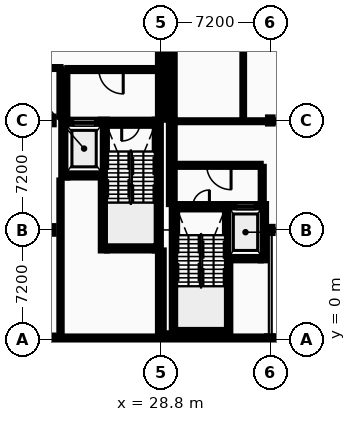
"""IFC4 building model, lengths in metres.
Left out: names, types, materials, properties, quantities, classifications, styles, units other than length and angle.
Written with IfcOpenShell. Run it as: python <this file> out.ifc"""

import sys

from ifc_helpers import new_model, si_unit, direction, frame, frame_2d, origin, origin_2d, place, context, subcontext, project, spatial, rectangle, hollow_circle, i_section, extrude, element, fill, save


model = new_model("IFC4")
c1 = context("Model", 3, precision=1e-05, world=origin(), true_north=direction((0.0, 1.0)))
c2 = subcontext(c1, "Body", "Model", "MODEL_VIEW")
j1 = project(units=[si_unit("LENGTHUNIT", "METRE"), si_unit("PLANEANGLEUNIT", "RADIAN")], contexts=[c1])
p1 = place(None, origin())
s1 = spatial("IfcSite", under=j1, at=p1, CompositionType="ELEMENT")
p2 = place(p1, origin())
s2 = spatial("IfcBuilding", under=s1, at=p2, CompositionType="ELEMENT")
p3 = place(p2, frame((0.0, 0.0, 5.2)))
s3 = spatial("IfcBuildingStorey", under=s2, at=p3, CompositionType="ELEMENT", Elevation=5.2)
for number, where, z_axis, x_axis in (
    (1, (21.6, 0.0, 0.0), (0.0, 0.0, 1.0), (1.0, 0.0, 0.0)),
    (2, (21.6, 7.2, 0.0), (0.0, 0.0, 1.0), (1.0, 0.0, 0.0)),
    (3, (21.6, 14.4, 0.0), (0.0, 0.0, 1.0), (1.0, 0.0, 0.0)),
    (4, (28.8, 0.0, 0.0), (0.0, 0.0, 1.0), (1.0, 0.0, 0.0)),
):
    element("IfcColumn", number, at=place(p3, frame(where, z_axis=z_axis, x_axis=x_axis)), inside=s3, PredefinedType="COLUMN", context=c2, shape_type="SweptSolid", body=[
        extrude(i_section(OverallWidth=0.3, OverallDepth=0.5, WebThickness=0.014, FlangeThickness=0.028, FilletRadius=0.027, at=origin_2d()), origin(), (0.0, 0.0, 1.0), 4.4),
    ])
for number, where, z_axis, x_axis in (
    (5, (29.52, 0.0, 0.0), (0.0, 0.0, 1.0), (1.0, 0.0, 0.0)),
    (6, (29.52, 14.4, 0.0), (0.0, 0.0, 1.0), (1.0, 0.0, 0.0)),
):
    element("IfcColumn", number, at=place(p3, frame(where, z_axis=z_axis, x_axis=x_axis)), inside=s3, PredefinedType="COLUMN", context=c2, shape_type="SweptSolid", body=[
        extrude(i_section(OverallWidth=0.3, OverallDepth=0.4, WebThickness=0.013, FlangeThickness=0.024, FilletRadius=0.027, at=origin_2d()), origin(), (0.0, 0.0, 1.0), 4.4),
    ])
p4 = place(p3, frame((36.0, 0.0, 0.0), z_axis=(0.0, 0.0, 1.0), x_axis=(1.0, 0.0, 0.0)))
e7 = element("IfcColumn", 7, at=p4, inside=s3, PredefinedType="COLUMN", context=c2, shape_type="SweptSolid", body=[
    extrude(hollow_circle(Radius=0.203, WallThickness=0.016, at=origin_2d()), origin(), (0.0, 0.0, 1.0), 4.4),
])
for number, where, z_axis, x_axis in (
    (8, (36.0, 7.2, 0.0), (0.0, 0.0, 1.0), (1.0, 0.0, 0.0)),
    (9, (36.0, 14.4, 0.0), (0.0, 0.0, 1.0), (1.0, 0.0, 0.0)),
):
    element("IfcColumn", number, at=place(p3, frame(where, z_axis=z_axis, x_axis=x_axis)), inside=s3, PredefinedType="COLUMN", context=c2, shape_type="SweptSolid", body=[
        extrude(i_section(OverallWidth=0.3, OverallDepth=0.4, WebThickness=0.013, FlangeThickness=0.024, FilletRadius=0.027, at=origin_2d()), origin(), (0.0, 0.0, 1.0), 4.4),
    ])
p5 = place(p3, frame((21.6, 0.0, 0.0), z_axis=(0.0, 0.0, 1.0), x_axis=(1.0, 0.0, 0.0)))
e10 = element("IfcWall", 10, at=p5, inside=s3, PredefinedType="STANDARD", context=c2, shape_type="SweptSolid", body=[
    extrude(rectangle(XDim=7.01, YDim=0.38, at=frame_2d((3.505, 0.0))), origin(), (0.0, 0.0, 1.0), 3.88),
])
p6 = place(p5, frame((1.537, 0.0, 0.95)))
e11 = element("IfcOpeningElement", 11, at=p6, cuts=e10, PredefinedType="OPENING", context=c2, shape_type="SweptSolid", body=[
    extrude(rectangle(XDim=1.132, YDim=1.26, at=frame_2d((0.566, 0.63))), frame((0.0, 0.2, 0.0), z_axis=(0.0, -1.0, 0.0), x_axis=(1.0, 0.0, 0.0)), (0.0, 0.0, 1.0), 0.4),
])
p7 = place(p5, frame((4.341, 0.0, 0.95)))
e12 = element("IfcOpeningElement", 12, at=p7, cuts=e10, PredefinedType="OPENING", context=c2, shape_type="SweptSolid", body=[
    extrude(rectangle(XDim=1.132, YDim=1.26, at=frame_2d((0.566, 0.63))), frame((0.0, 0.2, 0.0), z_axis=(0.0, -1.0, 0.0), x_axis=(1.0, 0.0, 0.0)), (0.0, 0.0, 1.0), 0.4),
])
p8 = place(p3, frame((28.8, -0.19, 0.0), z_axis=(0.0, 0.0, 1.0), x_axis=(0.0, 1.0, 0.0)))
e13 = element("IfcWall", 13, at=p8, inside=s3, PredefinedType="STANDARD", context=c2, shape_type="SweptSolid", body=[
    extrude(rectangle(XDim=6.04, YDim=0.38, at=frame_2d((3.02, 0.0))), origin(), (0.0, 0.0, 1.0), 4.185),
])
p9 = place(p8, frame((2.522, 0.0, 0.95)))
e14 = element("IfcOpeningElement", 14, at=p9, cuts=e13, PredefinedType="OPENING", context=c2, shape_type="SweptSolid", body=[
    extrude(rectangle(XDim=0.996, YDim=1.296, at=frame_2d((0.498, 0.648))), frame((0.0, 0.2, 0.0), z_axis=(0.0, -1.0, 0.0), x_axis=(1.0, 0.0, 0.0)), (0.0, 0.0, 1.0), 0.4),
])
p10 = place(p3, frame((28.8, 14.45, 0.0), z_axis=(0.0, 0.0, 1.0), x_axis=(0.0, 1.0, 0.0)))
e15 = element("IfcWall", 15, at=p10, inside=s3, PredefinedType="STANDARD", context=c2, shape_type="SweptSolid", body=[
    extrude(rectangle(XDim=7.15, YDim=0.38, at=frame_2d((3.575, 0.0))), origin(), (0.0, 0.0, 1.0), 4.185),
])
p11 = place(p10, frame((1.63, 0.0, 0.95)))
e16 = element("IfcOpeningElement", 16, at=p11, cuts=e15, PredefinedType="OPENING", context=c2, shape_type="SweptSolid", body=[
    extrude(rectangle(XDim=1.03, YDim=1.296, at=frame_2d((0.515, 0.648))), frame((0.0, 0.2, 0.0), z_axis=(0.0, -1.0, 0.0), x_axis=(1.0, 0.0, 0.0)), (0.0, 0.0, 1.0), 0.4),
])
p12 = place(p10, frame((4.49, 0.0, 0.95)))
e17 = element("IfcOpeningElement", 17, at=p12, cuts=e15, PredefinedType="OPENING", context=c2, shape_type="SweptSolid", body=[
    extrude(rectangle(XDim=1.03, YDim=1.296, at=frame_2d((0.515, 0.648))), frame((0.0, 0.2, 0.0), z_axis=(0.0, -1.0, 0.0), x_axis=(1.0, 0.0, 0.0)), (0.0, 0.0, 1.0), 0.4),
])
p13 = place(p3, frame((29.71, 0.0, 0.0), z_axis=(0.0, 0.0, 1.0), x_axis=(1.0, 0.0, 0.0)))
e18 = element("IfcWall", 18, at=p13, inside=s3, PredefinedType="STANDARD", context=c2, shape_type="SweptSolid", body=[
    extrude(rectangle(XDim=6.4, YDim=0.38, at=frame_2d((3.2, 0.0))), origin(), (0.0, 0.0, 1.0), 3.88),
])
p14 = place(p3, frame((29.52, 0.4, 0.0), z_axis=(0.0, 0.0, 1.0), x_axis=(0.0, -1.0, 0.0)))
e19 = element("IfcWall", 19, at=p14, inside=s3, PredefinedType="STANDARD", context=c2, shape_type="SweptSolid", body=[
    extrude(rectangle(XDim=0.59, YDim=0.38, at=frame_2d((0.295, 0.0))), origin(), (0.0, 0.0, 1.0), 4.185),
])
p15 = place(p3, frame((29.52, 14.4, 0.0), z_axis=(0.0, 0.0, 1.0), x_axis=(0.0, -1.0, 0.0)))
e20 = element("IfcWall", 20, at=p15, inside=s3, PredefinedType="STANDARD", context=c2, shape_type="SweptSolid", body=[
    extrude(rectangle(XDim=5.5, YDim=0.38, at=frame_2d((2.75, 0.0))), origin(), (0.0, 0.0, 1.0), 4.185),
])
p16 = place(p3, frame((29.52, 21.6, 0.0), z_axis=(0.0, 0.0, 1.0), x_axis=(0.0, -1.0, 0.0)))
e21 = element("IfcWall", 21, at=p16, inside=s3, PredefinedType="STANDARD", context=c2, shape_type="SweptSolid", body=[
    extrude(rectangle(XDim=7.2, YDim=0.38, at=frame_2d((3.6, 0.0))), origin(), (0.0, 0.0, 1.0), 3.88),
])
p17 = place(p16, frame((1.645, 0.0, 0.95)))
e22 = element("IfcOpeningElement", 22, at=p17, cuts=e21, PredefinedType="OPENING", context=c2, shape_type="SweptSolid", body=[
    extrude(rectangle(XDim=1.03, YDim=1.332, at=frame_2d((0.515, 0.666))), frame((0.0, 0.2, 0.0), z_axis=(0.0, -1.0, 0.0), x_axis=(1.0, 0.0, 0.0)), (0.0, 0.0, 1.0), 0.4),
])
p18 = place(p16, frame((4.525, 0.0, 0.95)))
e23 = element("IfcOpeningElement", 23, at=p18, cuts=e21, PredefinedType="OPENING", context=c2, shape_type="SweptSolid", body=[
    extrude(rectangle(XDim=1.03, YDim=1.332, at=frame_2d((0.515, 0.666))), frame((0.0, 0.2, 0.0), z_axis=(0.0, -1.0, 0.0), x_axis=(1.0, 0.0, 0.0)), (0.0, 0.0, 1.0), 0.4),
])
p19 = place(p3, frame((25.25, 6.05, 0.0), z_axis=(0.0, 0.0, 1.0), x_axis=(1.0, 0.0, 0.0)))
e24 = element("IfcWall", 24, at=p19, inside=s3, PredefinedType="SHEAR", context=c2, shape_type="SweptSolid", body=[
    extrude(rectangle(XDim=3.15, YDim=0.4, at=frame_2d((1.575, 0.0))), origin(), (0.0, 0.0, 1.0), 4.185),
])
p20 = place(p3, frame((25.25, 14.25, 0.0), z_axis=(0.0, 0.0, 1.0), x_axis=(1.0, 0.0, 0.0)))
e25 = element("IfcWall", 25, at=p20, inside=s3, PredefinedType="SHEAR", context=c2, shape_type="SweptSolid", body=[
    extrude(rectangle(XDim=3.15, YDim=0.4, at=frame_2d((1.575, 0.0))), origin(), (0.0, 0.0, 1.0), 4.185),
])
p21 = place(p20, frame((0.975, 0.0, 0.0)))
e26 = element("IfcOpeningElement", 26, at=p21, cuts=e25, PredefinedType="OPENING", context=c2, shape_type="SweptSolid", body=[
    extrude(rectangle(XDim=1.2, YDim=2.15, at=frame_2d((0.6, 1.075))), frame((0.0, 0.21, 0.0), z_axis=(0.0, -1.0, 0.0), x_axis=(1.0, 0.0, 0.0)), (0.0, 0.0, 1.0), 0.42),
])
for number, where, z_axis, x_axis in (
    (27, (25.05, 5.85, 0.0), (0.0, 0.0, 1.0), (0.0, 1.0, 0.0)),
    (28, (28.6, 5.85, 0.0), (0.0, 0.0, 1.0), (0.0, 1.0, 0.0)),
):
    element("IfcWall", number, at=place(p3, frame(where, z_axis=z_axis, x_axis=x_axis)), inside=s3, PredefinedType="SHEAR", context=c2, shape_type="SweptSolid", body=[
        extrude(rectangle(XDim=8.6, YDim=0.4, at=frame_2d((4.3, 0.0))), origin(), (0.0, 0.0, 1.0), 4.185),
    ])
p22 = place(p3, frame((22.65, 10.85, 0.0), z_axis=(0.0, 0.0, 1.0), x_axis=(1.0, 0.0, 0.0)))
e29 = element("IfcWall", 29, at=p22, inside=s3, PredefinedType="SHEAR", context=c2, shape_type="SweptSolid", body=[
    extrude(rectangle(XDim=2.2, YDim=0.4, at=frame_2d((1.1, 0.0))), origin(), (0.0, 0.0, 1.0), 4.185),
])
p23 = place(p3, frame((22.65, 14.25, 0.0), z_axis=(0.0, 0.0, 1.0), x_axis=(1.0, 0.0, 0.0)))
e30 = element("IfcWall", 30, at=p23, inside=s3, PredefinedType="SHEAR", context=c2, shape_type="SweptSolid", body=[
    extrude(rectangle(XDim=2.2, YDim=0.4, at=frame_2d((1.1, 0.0))), origin(), (0.0, 0.0, 1.0), 4.185),
])
p24 = place(p23, frame((0.4, 0.0, 0.0)))
e31 = element("IfcOpeningElement", 31, at=p24, cuts=e30, PredefinedType="OPENING", context=c2, shape_type="SweptSolid", body=[
    extrude(rectangle(XDim=1.4, YDim=2.2, at=frame_2d((0.7, 1.1))), frame((0.0, 0.21, 0.0), z_axis=(0.0, -1.0, 0.0), x_axis=(1.0, 0.0, 0.0)), (0.0, 0.0, 1.0), 0.42),
])
p25 = place(p3, frame((22.45, 10.65, 0.0), z_axis=(0.0, 0.0, 1.0), x_axis=(0.0, 1.0, 0.0)))
e32 = element("IfcWall", 32, at=p25, inside=s3, PredefinedType="SHEAR", context=c2, shape_type="SweptSolid", body=[
    extrude(rectangle(XDim=3.8, YDim=0.4, at=frame_2d((1.9, 0.0))), origin(), (0.0, 0.0, 1.0), 4.185),
])
p26 = place(p3, frame((22.65, 17.75, 0.0), z_axis=(0.0, 0.0, 1.0), x_axis=(1.0, 0.0, 0.0)))
e33 = element("IfcWall", 33, at=p26, inside=s3, PredefinedType="PARTITIONING", context=c2, shape_type="SweptSolid", body=[
    extrude(rectangle(XDim=5.75, YDim=0.2, at=frame_2d((2.875, 0.0))), origin(), (0.0, 0.0, 1.0), 4.185),
])
p27 = place(p26, frame((2.075, 0.0, 0.0)))
e34 = element("IfcOpeningElement", 34, at=p27, cuts=e33, PredefinedType="OPENING", context=c2, shape_type="SweptSolid", body=[
    extrude(rectangle(XDim=1.6, YDim=2.2, at=frame_2d((0.8, 1.1))), frame((0.0, 0.11, 0.0), z_axis=(0.0, -1.0, 0.0), x_axis=(1.0, 0.0, 0.0)), (0.0, 0.0, 1.0), 0.22),
])
p28 = place(p3, frame((22.55, 14.45, 0.0), z_axis=(0.0, 0.0, 1.0), x_axis=(0.0, 1.0, 0.0)))
e35 = element("IfcWall", 35, at=p28, inside=s3, PredefinedType="PARTITIONING", context=c2, shape_type="SweptSolid", body=[
    extrude(rectangle(XDim=3.2, YDim=0.2, at=frame_2d((1.6, 0.0))), origin(), (0.0, 0.0, 1.0), 4.185),
])
p29 = place(p3, frame((29.87, 0.575, 0.0), z_axis=(0.0, 0.0, 1.0), x_axis=(1.0, 0.0, 0.0)))
e36 = element("IfcWall", 36, at=p29, inside=s3, PredefinedType="SHEAR", context=c2, shape_type="SweptSolid", body=[
    extrude(rectangle(XDim=3.15, YDim=0.35, at=frame_2d((1.575, 0.0))), origin(), (0.0, 0.0, 1.0), 4.185),
])
p30 = place(p3, frame((29.87, 8.725, 0.0), z_axis=(0.0, 0.0, 1.0), x_axis=(1.0, 0.0, 0.0)))
e37 = element("IfcWall", 37, at=p30, inside=s3, PredefinedType="SHEAR", context=c2, shape_type="SweptSolid", body=[
    extrude(rectangle(XDim=3.15, YDim=0.35, at=frame_2d((1.575, 0.0))), origin(), (0.0, 0.0, 1.0), 4.185),
])
p31 = place(p30, frame((1.025, 0.0, 0.0)))
e38 = element("IfcOpeningElement", 38, at=p31, cuts=e37, PredefinedType="OPENING", context=c2, shape_type="SweptSolid", body=[
    extrude(rectangle(XDim=1.1, YDim=2.15, at=frame_2d((0.55, 1.075))), frame((0.0, 0.185, 0.0), z_axis=(0.0, -1.0, 0.0), x_axis=(1.0, 0.0, 0.0)), (0.0, 0.0, 1.0), 0.37),
])
for number, where, z_axis, x_axis in (
    (39, (29.695, 0.4, 0.0), (0.0, 0.0, 1.0), (0.0, 1.0, 0.0)),
    (40, (33.195, 0.4, 0.0), (0.0, 0.0, 1.0), (0.0, 1.0, 0.0)),
):
    element("IfcWall", number, at=place(p3, frame(where, z_axis=z_axis, x_axis=x_axis)), inside=s3, PredefinedType="SHEAR", context=c2, shape_type="SweptSolid", body=[
        extrude(rectangle(XDim=8.5, YDim=0.35, at=frame_2d((4.25, 0.0))), origin(), (0.0, 0.0, 1.0), 4.185),
    ])
p32 = place(p3, frame((33.37, 5.375, 0.0), z_axis=(0.0, 0.0, 1.0), x_axis=(1.0, 0.0, 0.0)))
e41 = element("IfcWall", 41, at=p32, inside=s3, PredefinedType="SHEAR", context=c2, shape_type="SweptSolid", body=[
    extrude(rectangle(XDim=2.0, YDim=0.35, at=frame_2d((1.0, 0.0))), origin(), (0.0, 0.0, 1.0), 4.185),
])
p33 = place(p3, frame((33.37, 8.725, 0.0), z_axis=(0.0, 0.0, 1.0), x_axis=(1.0, 0.0, 0.0)))
e42 = element("IfcWall", 42, at=p33, inside=s3, PredefinedType="SHEAR", context=c2, shape_type="SweptSolid", body=[
    extrude(rectangle(XDim=2.0, YDim=0.35, at=frame_2d((1.0, 0.0))), origin(), (0.0, 0.0, 1.0), 4.185),
])
p34 = place(p33, frame((0.4, 0.0, 0.0)))
e43 = element("IfcOpeningElement", 43, at=p34, cuts=e42, PredefinedType="OPENING", context=c2, shape_type="SweptSolid", body=[
    extrude(rectangle(XDim=1.2, YDim=2.2, at=frame_2d((0.6, 1.1))), frame((0.0, 0.185, 0.0), z_axis=(0.0, -1.0, 0.0), x_axis=(1.0, 0.0, 0.0)), (0.0, 0.0, 1.0), 0.37),
])
p35 = place(p3, frame((35.545, 5.2, 0.0), z_axis=(0.0, 0.0, 1.0), x_axis=(0.0, 1.0, 0.0)))
e44 = element("IfcWall", 44, at=p35, inside=s3, PredefinedType="SHEAR", context=c2, shape_type="SweptSolid", body=[
    extrude(rectangle(XDim=3.7, YDim=0.35, at=frame_2d((1.85, 0.0))), origin(), (0.0, 0.0, 1.0), 4.185),
])
p36 = place(p3, frame((29.87, 11.45, 0.0), z_axis=(0.0, 0.0, 1.0), x_axis=(1.0, 0.0, 0.0)))
e45 = element("IfcWall", 45, at=p36, inside=s3, PredefinedType="PARTITIONING", context=c2, shape_type="SweptSolid", body=[
    extrude(rectangle(XDim=5.5, YDim=0.2, at=frame_2d((2.75, 0.0))), origin(), (0.0, 0.0, 1.0), 4.185),
])
p37 = place(p36, frame((1.95, 0.0, 0.0)))
e46 = element("IfcOpeningElement", 46, at=p37, cuts=e45, PredefinedType="OPENING", context=c2, shape_type="SweptSolid", body=[
    extrude(rectangle(XDim=1.6, YDim=2.2, at=frame_2d((0.8, 1.1))), frame((0.0, 0.11, 0.0), z_axis=(0.0, -1.0, 0.0), x_axis=(1.0, 0.0, 0.0)), (0.0, 0.0, 1.0), 0.22),
])
p38 = place(p3, frame((35.47, 8.9, 0.0), z_axis=(0.0, 0.0, 1.0), x_axis=(0.0, 1.0, 0.0)))
e47 = element("IfcWall", 47, at=p38, inside=s3, PredefinedType="PARTITIONING", context=c2, shape_type="SweptSolid", body=[
    extrude(rectangle(XDim=2.45, YDim=0.2, at=frame_2d((1.225, 0.0))), origin(), (0.0, 0.0, 1.0), 4.185),
])
p39 = place(p3, frame((29.9, 14.35, 0.0), z_axis=(0.0, 0.0, 1.0), x_axis=(1.0, 0.0, 0.0)))
e48 = element("IfcWall", 48, at=p39, inside=s3, PredefinedType="PARTITIONING", context=c2, shape_type="SweptSolid", body=[
    extrude(rectangle(XDim=5.72, YDim=0.125, at=frame_2d((2.86, 0.0))), origin(), (0.0, 0.0, 1.0), 3.88),
])
p40 = place(p39, frame((2.87, 0.0, 0.0)))
e49 = element("IfcOpeningElement", 49, at=p40, cuts=e48, PredefinedType="OPENING", context=c2, shape_type="SweptSolid", body=[
    extrude(rectangle(XDim=1.0, YDim=2.1, at=frame_2d((0.5, 1.05))), frame((0.0, 0.073, 0.0), z_axis=(0.0, -1.0, 0.0), x_axis=(1.0, 0.0, 0.0)), (0.0, 0.0, 1.0), 0.145),
])
p41 = place(p3, frame((9.45, 17.85, 0.0), z_axis=(0.0, 0.0, 1.0), x_axis=(1.0, 0.0, 0.0)))
e50 = element("IfcWall", 50, at=p41, inside=s3, PredefinedType="PARTITIONING", context=c2, shape_type="SweptSolid", body=[
    extrude(rectangle(XDim=12.75, YDim=0.125, at=frame_2d((6.375, 0.0))), origin(), (0.0, 0.0, 1.0), 4.185),
])
p42 = place(p41, frame((1.2, 0.0, 0.0)))
e51 = element("IfcOpeningElement", 51, at=p42, cuts=e50, PredefinedType="OPENING", context=c2, shape_type="SweptSolid", body=[
    extrude(rectangle(XDim=1.0, YDim=2.1, at=frame_2d((0.5, 1.05))), frame((0.0, 0.073, 0.0), z_axis=(0.0, -1.0, 0.0), x_axis=(1.0, 0.0, 0.0)), (0.0, 0.0, 1.0), 0.145),
])
p43 = place(p41, frame((5.9, 0.0, 0.0)))
e52 = element("IfcOpeningElement", 52, at=p43, cuts=e50, PredefinedType="OPENING", context=c2, shape_type="SweptSolid", body=[
    extrude(rectangle(XDim=0.9, YDim=2.1, at=frame_2d((0.45, 1.05))), frame((0.0, 0.073, 0.0), z_axis=(0.0, -1.0, 0.0), x_axis=(1.0, 0.0, 0.0)), (0.0, 0.0, 1.0), 0.145),
])
p44 = place(p41, frame((7.7, 0.0, 0.0)))
e53 = element("IfcOpeningElement", 53, at=p44, cuts=e50, PredefinedType="OPENING", context=c2, shape_type="SweptSolid", body=[
    extrude(rectangle(XDim=1.192, YDim=2.096, at=frame_2d((0.596, 1.048))), frame((0.0, 0.073, 0.0), z_axis=(0.0, -1.0, 0.0), x_axis=(1.0, 0.0, 0.0)), (0.0, 0.0, 1.0), 0.145),
])
p45 = place(p3, frame((22.2, 0.2, 0.0), z_axis=(0.0, 0.0, 1.0), x_axis=(0.0, 1.0, 0.0)))
e54 = element("IfcWall", 54, at=p45, inside=s3, PredefinedType="PARTITIONING", context=c2, shape_type="SweptSolid", body=[
    extrude(rectangle(XDim=10.25, YDim=0.15, at=frame_2d((5.125, 0.0))), origin(), (0.0, 0.0, 1.0), 4.185),
])
p46 = place(p3, frame((22.2, 14.65, 0.0), z_axis=(0.0, 0.0, 1.0), x_axis=(0.0, 1.0, 0.0)))
e55 = element("IfcWall", 55, at=p46, inside=s3, PredefinedType="PARTITIONING", context=c2, shape_type="SweptSolid", body=[
    extrude(rectangle(XDim=3.138, YDim=0.142, at=frame_2d((1.569, 0.0))), origin(), (0.0, 0.0, 1.0), 4.185),
])
p47 = place(p3, frame((34.22, 14.413, 0.0), z_axis=(0.0, 0.0, 1.0), x_axis=(0.0, 1.0, 0.0)))
e56 = element("IfcWall", 56, at=p47, inside=s3, PredefinedType="PARTITIONING", context=c2, shape_type="SweptSolid", body=[
    extrude(rectangle(XDim=14.188, YDim=0.11, at=frame_2d((7.094, 0.0))), origin(), (0.0, 0.0, 1.0), 4.185),
])
p48 = place(p6, origin())
e57 = element("IfcWindow", 57, at=p48, inside=s3, PartitioningType="SINGLE_PANEL", PredefinedType="WINDOW", context=c2, shape_type="SweptSolid", body=[
    extrude(rectangle(XDim=1.132, YDim=1.26, at=frame_2d((0.566, 0.63))), frame((0.0, 0.03, 0.0), z_axis=(0.0, -1.0, 0.0), x_axis=(1.0, 0.0, 0.0)), (0.0, 0.0, 1.0), 0.06),
])
fill(e11, e57)
p49 = place(p7, origin())
e58 = element("IfcWindow", 58, at=p49, inside=s3, PartitioningType="SINGLE_PANEL", PredefinedType="WINDOW", context=c2, shape_type="SweptSolid", body=[
    extrude(rectangle(XDim=1.132, YDim=1.26, at=frame_2d((0.566, 0.63))), frame((0.0, 0.03, 0.0), z_axis=(0.0, -1.0, 0.0), x_axis=(1.0, 0.0, 0.0)), (0.0, 0.0, 1.0), 0.06),
])
fill(e12, e58)
p50 = place(p9, origin())
e59 = element("IfcWindow", 59, at=p50, inside=s3, PartitioningType="SINGLE_PANEL", PredefinedType="WINDOW", context=c2, shape_type="SweptSolid", body=[
    extrude(rectangle(XDim=0.996, YDim=1.296, at=frame_2d((0.498, 0.648))), frame((0.0, 0.03, 0.0), z_axis=(0.0, -1.0, 0.0), x_axis=(1.0, 0.0, 0.0)), (0.0, 0.0, 1.0), 0.06),
])
fill(e14, e59)
p51 = place(p11, origin())
e60 = element("IfcWindow", 60, at=p51, inside=s3, PartitioningType="SINGLE_PANEL", PredefinedType="WINDOW", context=c2, shape_type="SweptSolid", body=[
    extrude(rectangle(XDim=1.03, YDim=1.296, at=frame_2d((0.515, 0.648))), frame((0.0, 0.03, 0.0), z_axis=(0.0, -1.0, 0.0), x_axis=(1.0, 0.0, 0.0)), (0.0, 0.0, 1.0), 0.06),
])
fill(e16, e60)
p52 = place(p18, origin())
e61 = element("IfcWindow", 61, at=p52, inside=s3, PartitioningType="SINGLE_PANEL", PredefinedType="WINDOW", context=c2, shape_type="SweptSolid", body=[
    extrude(rectangle(XDim=1.03, YDim=1.332, at=frame_2d((0.515, 0.666))), frame((0.0, 0.03, 0.0), z_axis=(0.0, -1.0, 0.0), x_axis=(1.0, 0.0, 0.0)), (0.0, 0.0, 1.0), 0.06),
])
fill(e23, e61)
p53 = place(p21, frame((1.2, 0.0, 0.0), z_axis=(0.0, 0.0, 1.0), x_axis=(-1.0, 0.0, 0.0)))
e62 = element("IfcDoor", 62, at=p53, inside=s3, OperationType="SINGLE_SWING_LEFT", PredefinedType="DOOR", context=c2, shape_type="SweptSolid", body=[
    extrude(rectangle(XDim=1.2, YDim=2.15, at=frame_2d((0.6, 1.075))), frame((0.0, 0.025, 0.0), z_axis=(0.0, -1.0, 0.0), x_axis=(1.0, 0.0, 0.0)), (0.0, 0.0, 1.0), 0.05),
])
fill(e26, e62)
p54 = place(p24, origin())
e63 = element("IfcDoor", 63, at=p54, inside=s3, OperationType="SLIDING_TO_LEFT", PredefinedType="DOOR", context=c2, shape_type="SweptSolid", body=[
    extrude(rectangle(XDim=1.4, YDim=2.2, at=frame_2d((0.7, 1.1))), frame((0.0, 0.025, 0.0), z_axis=(0.0, -1.0, 0.0), x_axis=(1.0, 0.0, 0.0)), (0.0, 0.0, 1.0), 0.05),
])
fill(e31, e63)
p55 = place(p27, origin())
e64 = element("IfcDoor", 64, at=p55, inside=s3, OperationType="DOUBLE_DOOR_SINGLE_SWING", PredefinedType="DOOR", context=c2, shape_type="SweptSolid", body=[
    extrude(rectangle(XDim=1.6, YDim=2.2, at=frame_2d((0.8, 1.1))), frame((0.0, 0.025, 0.0), z_axis=(0.0, -1.0, 0.0), x_axis=(1.0, 0.0, 0.0)), (0.0, 0.0, 1.0), 0.05),
])
fill(e34, e64)
p56 = place(p31, frame((1.1, 0.0, 0.0), z_axis=(0.0, 0.0, 1.0), x_axis=(-1.0, 0.0, 0.0)))
e65 = element("IfcDoor", 65, at=p56, inside=s3, OperationType="SINGLE_SWING_RIGHT", PredefinedType="DOOR", context=c2, shape_type="SweptSolid", body=[
    extrude(rectangle(XDim=1.1, YDim=2.15, at=frame_2d((0.55, 1.075))), frame((0.0, 0.025, 0.0), z_axis=(0.0, -1.0, 0.0), x_axis=(1.0, 0.0, 0.0)), (0.0, 0.0, 1.0), 0.05),
])
fill(e38, e65)
p57 = place(p34, origin())
e66 = element("IfcDoor", 66, at=p57, inside=s3, OperationType="SLIDING_TO_RIGHT", PredefinedType="DOOR", context=c2, shape_type="SweptSolid", body=[
    extrude(rectangle(XDim=1.2, YDim=2.2, at=frame_2d((0.6, 1.1))), frame((0.0, 0.025, 0.0), z_axis=(0.0, -1.0, 0.0), x_axis=(1.0, 0.0, 0.0)), (0.0, 0.0, 1.0), 0.05),
])
fill(e43, e66)
p58 = place(p37, origin())
e67 = element("IfcDoor", 67, at=p58, inside=s3, OperationType="DOUBLE_DOOR_SINGLE_SWING", PredefinedType="DOOR", context=c2, shape_type="SweptSolid", body=[
    extrude(rectangle(XDim=1.6, YDim=2.2, at=frame_2d((0.8, 1.1))), frame((0.0, 0.025, 0.0), z_axis=(0.0, -1.0, 0.0), x_axis=(1.0, 0.0, 0.0)), (0.0, 0.0, 1.0), 0.05),
])
fill(e46, e67)
p59 = place(p40, frame((1.0, 0.0, 0.0), z_axis=(0.0, 0.0, 1.0), x_axis=(-1.0, 0.0, 0.0)))
e68 = element("IfcDoor", 68, at=p59, inside=s3, OperationType="SLIDING_TO_LEFT", PredefinedType="DOOR", context=c2, shape_type="SweptSolid", body=[
    extrude(rectangle(XDim=1.0, YDim=2.1, at=frame_2d((0.5, 1.05))), frame((0.0, 0.025, 0.0), z_axis=(0.0, -1.0, 0.0), x_axis=(1.0, 0.0, 0.0)), (0.0, 0.0, 1.0), 0.05),
])
fill(e49, e68)
save(model, sys.argv[1])
